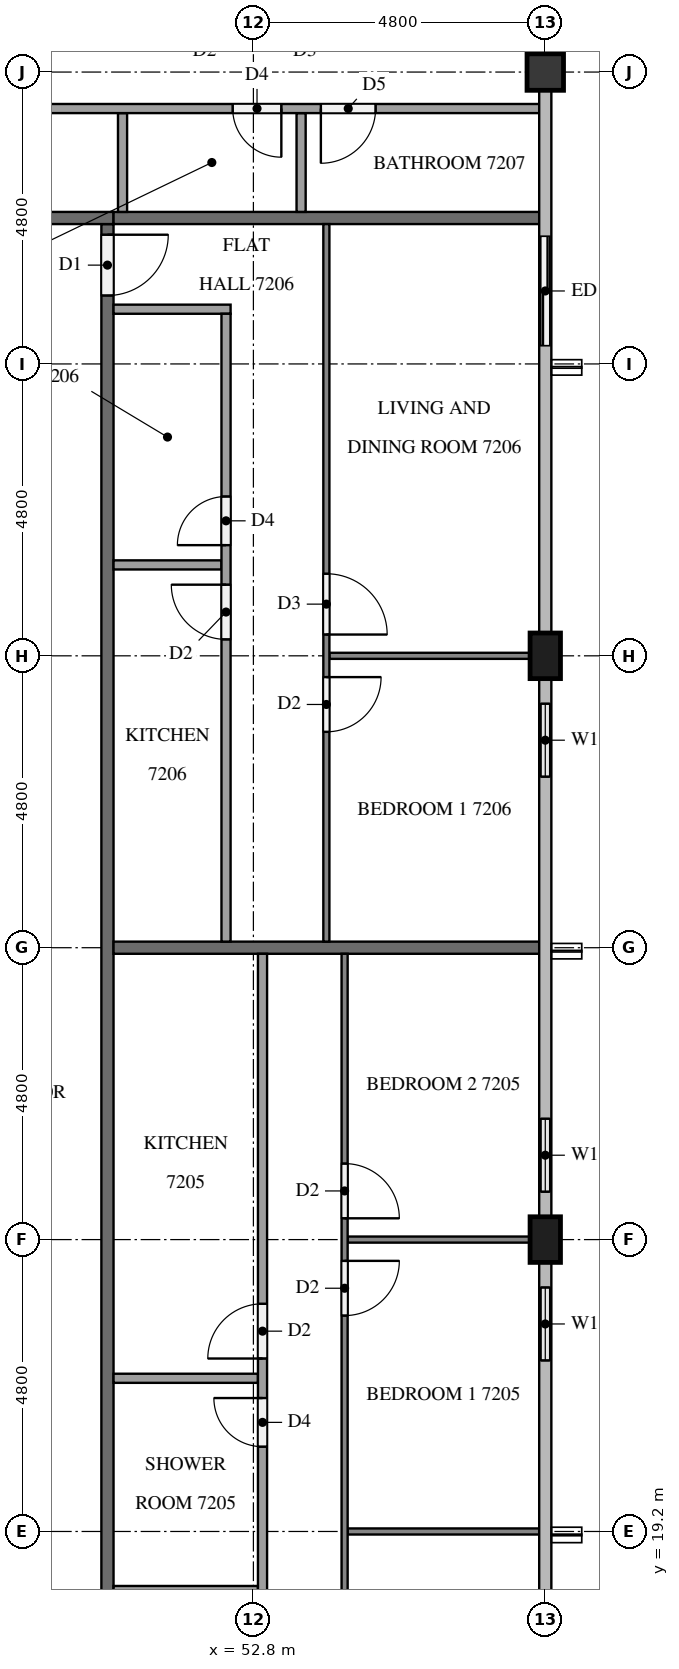
"""IFC4 building model, lengths in metres.
Left out: names, types, materials, properties, quantities, classifications, styles, units other than length and angle.
Written with IfcOpenShell. Run it as: python <this file> out.ifc"""

import sys

from ifc_helpers import new_model, si_unit, direction, frame, frame_2d, origin, origin_2d, place, context, subcontext, project, spatial, rectangle, extrude, element, fill, save


model = new_model("IFC4")
c1 = context("Model", 3, precision=1e-05, world=origin(), true_north=direction((0.0, 1.0)))
c2 = subcontext(c1, "Body", "Model", "MODEL_VIEW")
j1 = project(units=[si_unit("LENGTHUNIT", "METRE"), si_unit("PLANEANGLEUNIT", "RADIAN")], contexts=[c1])
p1 = place(None, origin())
s1 = spatial("IfcSite", under=j1, at=p1, CompositionType="ELEMENT")
p2 = place(p1, origin())
s2 = spatial("IfcBuilding", under=s1, at=p2, CompositionType="ELEMENT")
p3 = place(p2, frame((0.0, 0.0, 275.6)))
s3 = spatial("IfcBuildingStorey", under=s2, at=p3, CompositionType="ELEMENT", Elevation=275.6)
for number, where, z_axis, x_axis in (
    (1, (57.6, 24.0, 0.0), (0.0, 0.0, 1.0), (0.0, 1.0, 0.0)),
    (2, (57.6, 33.6, 0.0), (0.0, 0.0, 1.0), (0.0, 1.0, 0.0)),
):
    element("IfcColumn", number, at=place(p3, frame(where, z_axis=z_axis, x_axis=x_axis)), inside=s3, PredefinedType="COLUMN", context=c2, shape_type="SweptSolid", body=[
        extrude(rectangle(XDim=0.75, YDim=0.5, at=origin_2d()), origin(), (0.0, 0.0, 1.0), 3.2),
    ])
p4 = place(p3, frame((57.6, 43.2, 0.0), z_axis=(0.0, 0.0, 1.0), x_axis=(1.0, 0.0, 0.0)))
e3 = element("IfcColumn", 3, at=p4, inside=s3, PredefinedType="COLUMN", context=c2, shape_type="SweptSolid", body=[
    extrude(rectangle(XDim=0.6, YDim=0.6, at=origin_2d()), origin(), (0.0, 0.0, 1.0), 3.2),
])
p5 = place(p3, frame((57.6, 21.6, 0.0), z_axis=(0.0, 0.0, 1.0), x_axis=(0.0, 1.0, 0.0)))
e4 = element("IfcWall", 4, at=p5, inside=s3, PredefinedType="SOLIDWALL", context=c2, shape_type="SweptSolid", body=[
    extrude(rectangle(XDim=2.025, YDim=0.15, at=frame_2d((1.012, 0.0))), origin(), (0.0, 0.0, 1.0), 3.2),
])
p6 = place(p5, frame((0.413, 0.0, 0.9)))
e5 = element("IfcOpeningElement", 5, at=p6, cuts=e4, PredefinedType="OPENING", context=c2, shape_type="SweptSolid", body=[
    extrude(rectangle(XDim=1.2, YDim=1.4, at=frame_2d((0.6, 0.7))), frame((0.0, 0.085, 0.0), z_axis=(0.0, -1.0, 0.0), x_axis=(1.0, 0.0, 0.0)), (0.0, 0.0, 1.0), 0.17),
])
p7 = place(p3, frame((57.6, 24.375, 0.0), z_axis=(0.0, 0.0, 1.0), x_axis=(0.0, 1.0, 0.0)))
e6 = element("IfcWall", 6, at=p7, inside=s3, PredefinedType="SOLIDWALL", context=c2, shape_type="SweptSolid", body=[
    extrude(rectangle(XDim=2.025, YDim=0.15, at=frame_2d((1.012, 0.0))), origin(), (0.0, 0.0, 1.0), 3.2),
])
p8 = place(p7, frame((0.413, 0.0, 0.9)))
e7 = element("IfcOpeningElement", 7, at=p8, cuts=e6, PredefinedType="OPENING", context=c2, shape_type="SweptSolid", body=[
    extrude(rectangle(XDim=1.2, YDim=1.4, at=frame_2d((0.6, 0.7))), frame((0.0, 0.085, 0.0), z_axis=(0.0, -1.0, 0.0), x_axis=(1.0, 0.0, 0.0)), (0.0, 0.0, 1.0), 0.17),
])
p9 = place(p3, frame((57.6, 31.2, 0.0), z_axis=(0.0, 0.0, 1.0), x_axis=(0.0, 1.0, 0.0)))
e8 = element("IfcWall", 8, at=p9, inside=s3, PredefinedType="SOLIDWALL", context=c2, shape_type="SweptSolid", body=[
    extrude(rectangle(XDim=2.025, YDim=0.15, at=frame_2d((1.013, 0.0))), origin(), (0.0, 0.0, 1.0), 3.2),
])
p10 = place(p9, frame((0.413, 0.0, 0.9)))
e9 = element("IfcOpeningElement", 9, at=p10, cuts=e8, PredefinedType="OPENING", context=c2, shape_type="SweptSolid", body=[
    extrude(rectangle(XDim=1.2, YDim=1.4, at=frame_2d((0.6, 0.7))), frame((0.0, 0.085, 0.0), z_axis=(0.0, -1.0, 0.0), x_axis=(1.0, 0.0, 0.0)), (0.0, 0.0, 1.0), 0.17),
])
p11 = place(p3, frame((57.6, 38.4, 0.0), z_axis=(0.0, 0.0, 1.0), x_axis=(0.0, 1.0, 0.0)))
e10 = element("IfcWall", 10, at=p11, inside=s3, PredefinedType="SOLIDWALL", context=c2, shape_type="SweptSolid", body=[
    extrude(rectangle(XDim=2.4, YDim=0.15, at=frame_2d((1.2, 0.0))), origin(), (0.0, 0.0, 1.0), 3.2),
])
p12 = place(p11, frame((0.3, 0.0, 0.0)))
e11 = element("IfcOpeningElement", 11, at=p12, cuts=e10, PredefinedType="OPENING", context=c2, shape_type="SweptSolid", body=[
    extrude(rectangle(XDim=1.8, YDim=2.4, at=frame_2d((0.9, 1.2))), frame((0.0, 0.085, 0.0), z_axis=(0.0, -1.0, 0.0), x_axis=(1.0, 0.0, 0.0)), (0.0, 0.0, 1.0), 0.17),
])
p13 = place(p3, frame((50.4, 40.7, 0.0), z_axis=(0.0, 0.0, 1.0), x_axis=(0.0, -1.0, 0.0)))
e12 = element("IfcWall", 12, at=p13, inside=s3, PredefinedType="PARTITIONING", context=c2, shape_type="SweptSolid", body=[
    extrude(rectangle(XDim=28.6, YDim=0.2, at=frame_2d((14.3, 0.0))), origin(), (0.0, 0.0, 1.0), 3.2),
])
p14 = place(p13, frame((27.425, 0.0, 0.0)))
e13 = element("IfcOpeningElement", 13, at=p14, cuts=e12, PredefinedType="OPENING", context=c2, shape_type="SweptSolid", body=[
    extrude(rectangle(XDim=1.0, YDim=2.1, at=frame_2d((0.5, 1.05))), frame((0.0, 0.11, 0.0), z_axis=(0.0, -1.0, 0.0), x_axis=(1.0, 0.0, 0.0)), (0.0, 0.0, 1.0), 0.22),
])
p15 = place(p13, frame((0.175, 0.0, 0.0)))
e14 = element("IfcOpeningElement", 14, at=p15, cuts=e12, PredefinedType="OPENING", context=c2, shape_type="SweptSolid", body=[
    extrude(rectangle(XDim=1.0, YDim=2.1, at=frame_2d((0.5, 1.05))), frame((0.0, 0.11, 0.0), z_axis=(0.0, -1.0, 0.0), x_axis=(1.0, 0.0, 0.0)), (0.0, 0.0, 1.0), 0.22),
])
p16 = place(p3, frame((11.9, 40.8, 0.0), z_axis=(0.0, 0.0, 1.0), x_axis=(1.0, 0.0, 0.0)))
e15 = element("IfcWall", 15, at=p16, inside=s3, PredefinedType="PARTITIONING", context=c2, shape_type="SweptSolid", body=[
    extrude(rectangle(XDim=38.6, YDim=0.2, at=frame_2d((19.3, 0.0))), origin(), (0.0, 0.0, 1.0), 3.2),
])
p17 = place(p16, frame((31.575, 0.0, 0.0)))
e16 = element("IfcOpeningElement", 16, at=p17, cuts=e15, PredefinedType="OPENING", context=c2, shape_type="SweptSolid", body=[
    extrude(rectangle(XDim=1.0, YDim=2.1, at=frame_2d((0.5, 1.05))), frame((0.0, 0.11, 0.0), z_axis=(0.0, -1.0, 0.0), x_axis=(1.0, 0.0, 0.0)), (0.0, 0.0, 1.0), 0.22),
])
p18 = place(p16, frame((24.375, 0.0, 0.0)))
e17 = element("IfcOpeningElement", 17, at=p18, cuts=e15, PredefinedType="OPENING", context=c2, shape_type="SweptSolid", body=[
    extrude(rectangle(XDim=1.0, YDim=2.1, at=frame_2d((0.5, 1.05))), frame((0.0, 0.11, 0.0), z_axis=(0.0, -1.0, 0.0), x_axis=(1.0, 0.0, 0.0)), (0.0, 0.0, 1.0), 0.22),
])
p19 = place(p16, frame((22.825, 0.0, 0.0)))
e18 = element("IfcOpeningElement", 18, at=p19, cuts=e15, PredefinedType="OPENING", context=c2, shape_type="SweptSolid", body=[
    extrude(rectangle(XDim=1.0, YDim=2.1, at=frame_2d((0.5, 1.05))), frame((0.0, 0.11, 0.0), z_axis=(0.0, -1.0, 0.0), x_axis=(1.0, 0.0, 0.0)), (0.0, 0.0, 1.0), 0.22),
])
p20 = place(p16, frame((0.375, 0.0, 0.0)))
e19 = element("IfcOpeningElement", 19, at=p20, cuts=e15, PredefinedType="OPENING", context=c2, shape_type="SweptSolid", body=[
    extrude(rectangle(XDim=1.0, YDim=2.1, at=frame_2d((0.5, 1.05))), frame((0.0, 0.11, 0.0), z_axis=(0.0, -1.0, 0.0), x_axis=(1.0, 0.0, 0.0)), (0.0, 0.0, 1.0), 0.22),
])
for number, where, z_axis, x_axis in (
    (20, (50.5, 28.8, 0.0), (0.0, 0.0, 1.0), (1.0, 0.0, 0.0)),
    (21, (50.5, 40.8, 0.0), (0.0, 0.0, 1.0), (1.0, 0.0, 0.0)),
):
    element("IfcWall", number, at=place(p3, frame(where, z_axis=z_axis, x_axis=x_axis)), inside=s3, PredefinedType="PARTITIONING", context=c2, shape_type="SweptSolid", body=[
        extrude(rectangle(XDim=7.0, YDim=0.2, at=frame_2d((3.5, 0.0))), origin(), (0.0, 0.0, 1.0), 3.2),
    ])
p21 = place(p3, frame((54.35, 19.2, 0.0), z_axis=(0.0, 0.0, 1.0), x_axis=(1.0, 0.0, 0.0)))
e22 = element("IfcWall", 22, at=p21, inside=s3, PredefinedType="PARTITIONING", context=c2, shape_type="SweptSolid", body=[
    extrude(rectangle(XDim=3.15, YDim=0.1, at=frame_2d((1.575, 0.0))), origin(), (0.0, 0.0, 1.0), 3.2),
])
p22 = place(p3, frame((54.35, 24.0, 0.0), z_axis=(0.0, 0.0, 1.0), x_axis=(1.0, 0.0, 0.0)))
e23 = element("IfcWall", 23, at=p22, inside=s3, PredefinedType="PARTITIONING", context=c2, shape_type="SweptSolid", body=[
    extrude(rectangle(XDim=3.0, YDim=0.1, at=frame_2d((1.5, 0.0))), origin(), (0.0, 0.0, 1.0), 3.2),
])
p23 = place(p3, frame((54.3, 28.7, 0.0), z_axis=(0.0, 0.0, 1.0), x_axis=(0.0, -1.0, 0.0)))
e24 = element("IfcWall", 24, at=p23, inside=s3, PredefinedType="PARTITIONING", context=c2, shape_type="SweptSolid", body=[
    extrude(rectangle(XDim=16.6, YDim=0.1, at=frame_2d((8.3, 0.0))), origin(), (0.0, 0.0, 1.0), 3.2),
])
p24 = place(p23, frame((15.3, 0.0, 0.0)))
e25 = element("IfcOpeningElement", 25, at=p24, cuts=e24, PredefinedType="OPENING", context=c2, shape_type="SweptSolid", body=[
    extrude(rectangle(XDim=1.0, YDim=2.1, at=frame_2d((0.5, 1.05))), frame((0.0, 0.06, 0.0), z_axis=(0.0, -1.0, 0.0), x_axis=(1.0, 0.0, 0.0)), (0.0, 0.0, 1.0), 0.12),
])
p25 = place(p23, frame((5.05, 0.0, 0.0)))
e26 = element("IfcOpeningElement", 26, at=p25, cuts=e24, PredefinedType="OPENING", context=c2, shape_type="SweptSolid", body=[
    extrude(rectangle(XDim=0.9, YDim=2.1, at=frame_2d((0.45, 1.05))), frame((0.0, 0.06, 0.0), z_axis=(0.0, -1.0, 0.0), x_axis=(1.0, 0.0, 0.0)), (0.0, 0.0, 1.0), 0.12),
])
p26 = place(p23, frame((3.45, 0.0, 0.0)))
e27 = element("IfcOpeningElement", 27, at=p26, cuts=e24, PredefinedType="OPENING", context=c2, shape_type="SweptSolid", body=[
    extrude(rectangle(XDim=0.9, YDim=2.1, at=frame_2d((0.45, 1.05))), frame((0.0, 0.06, 0.0), z_axis=(0.0, -1.0, 0.0), x_axis=(1.0, 0.0, 0.0)), (0.0, 0.0, 1.0), 0.12),
])
for number, where, z_axis, x_axis in (
    (28, (50.5, 18.229, 0.0), (0.0, 0.0, 1.0), (1.0, 0.0, 0.0)),
    (29, (50.5, 21.719, 0.0), (0.0, 0.0, 1.0), (1.0, 0.0, 0.0)),
):
    element("IfcWall", number, at=place(p3, frame(where, z_axis=z_axis, x_axis=x_axis)), inside=s3, PredefinedType="PARTITIONING", context=c2, shape_type="SweptSolid", body=[
        extrude(rectangle(XDim=2.375, YDim=0.15, at=frame_2d((1.188, 0.0))), origin(), (0.0, 0.0, 1.0), 3.2),
    ])
p27 = place(p3, frame((52.95, 13.575, 0.0), z_axis=(0.0, 0.0, 1.0), x_axis=(0.0, 1.0, 0.0)))
e30 = element("IfcWall", 30, at=p27, inside=s3, PredefinedType="PARTITIONING", context=c2, shape_type="SweptSolid", body=[
    extrude(rectangle(XDim=15.125, YDim=0.15, at=frame_2d((7.562, 0.0))), origin(), (0.0, 0.0, 1.0), 3.2),
])
p28 = place(p27, frame((0.3, 0.0, 0.0)))
e31 = element("IfcOpeningElement", 31, at=p28, cuts=e30, PredefinedType="OPENING", context=c2, shape_type="SweptSolid", body=[
    extrude(rectangle(XDim=0.9, YDim=2.1, at=frame_2d((0.45, 1.05))), frame((0.0, 0.085, 0.0), z_axis=(0.0, -1.0, 0.0), x_axis=(1.0, 0.0, 0.0)), (0.0, 0.0, 1.0), 0.17),
])
p29 = place(p27, frame((7.019, 0.0, 0.0)))
e32 = element("IfcOpeningElement", 32, at=p29, cuts=e30, PredefinedType="OPENING", context=c2, shape_type="SweptSolid", body=[
    extrude(rectangle(XDim=0.8, YDim=2.1, at=frame_2d((0.4, 1.05))), frame((0.0, 0.085, 0.0), z_axis=(0.0, -1.0, 0.0), x_axis=(1.0, 0.0, 0.0)), (0.0, 0.0, 1.0), 0.17),
])
p30 = place(p27, frame((8.469, 0.0, 0.0)))
e33 = element("IfcOpeningElement", 33, at=p30, cuts=e30, PredefinedType="OPENING", context=c2, shape_type="SweptSolid", body=[
    extrude(rectangle(XDim=0.9, YDim=2.1, at=frame_2d((0.45, 1.05))), frame((0.0, 0.085, 0.0), z_axis=(0.0, -1.0, 0.0), x_axis=(1.0, 0.0, 0.0)), (0.0, 0.0, 1.0), 0.17),
])
p31 = place(p3, frame((54.05, 33.6, 0.0), z_axis=(0.0, 0.0, 1.0), x_axis=(1.0, 0.0, 0.0)))
e34 = element("IfcWall", 34, at=p31, inside=s3, PredefinedType="PARTITIONING", context=c2, shape_type="SweptSolid", body=[
    extrude(rectangle(XDim=3.3, YDim=0.1, at=frame_2d((1.65, 0.0))), origin(), (0.0, 0.0, 1.0), 3.2),
])
p32 = place(p3, frame((54.0, 40.7, 0.0), z_axis=(0.0, 0.0, 1.0), x_axis=(0.0, -1.0, 0.0)))
e35 = element("IfcWall", 35, at=p32, inside=s3, PredefinedType="PARTITIONING", context=c2, shape_type="SweptSolid", body=[
    extrude(rectangle(XDim=11.8, YDim=0.1, at=frame_2d((5.9, 0.0))), origin(), (0.0, 0.0, 1.0), 3.2),
])
p33 = place(p32, frame((5.75, 0.0, 0.0)))
e36 = element("IfcOpeningElement", 36, at=p33, cuts=e35, PredefinedType="OPENING", context=c2, shape_type="SweptSolid", body=[
    extrude(rectangle(XDim=1.0, YDim=2.1, at=frame_2d((0.5, 1.05))), frame((0.0, 0.06, 0.0), z_axis=(0.0, -1.0, 0.0), x_axis=(1.0, 0.0, 0.0)), (0.0, 0.0, 1.0), 0.12),
])
p34 = place(p32, frame((7.45, 0.0, 0.0)))
e37 = element("IfcOpeningElement", 37, at=p34, cuts=e35, PredefinedType="OPENING", context=c2, shape_type="SweptSolid", body=[
    extrude(rectangle(XDim=0.9, YDim=2.1, at=frame_2d((0.45, 1.05))), frame((0.0, 0.06, 0.0), z_axis=(0.0, -1.0, 0.0), x_axis=(1.0, 0.0, 0.0)), (0.0, 0.0, 1.0), 0.12),
])
p35 = place(p3, frame((50.5, 35.095, 0.0), z_axis=(0.0, 0.0, 1.0), x_axis=(1.0, 0.0, 0.0)))
e38 = element("IfcWall", 38, at=p35, inside=s3, PredefinedType="PARTITIONING", context=c2, shape_type="SweptSolid", body=[
    extrude(rectangle(XDim=1.775, YDim=0.15, at=frame_2d((0.887, 0.0))), origin(), (0.0, 0.0, 1.0), 3.2),
])
p36 = place(p3, frame((50.5, 39.3, 0.0), z_axis=(0.0, 0.0, 1.0), x_axis=(1.0, 0.0, 0.0)))
e39 = element("IfcWall", 39, at=p36, inside=s3, PredefinedType="PARTITIONING", context=c2, shape_type="SweptSolid", body=[
    extrude(rectangle(XDim=1.925, YDim=0.15, at=frame_2d((0.962, 0.0))), origin(), (0.0, 0.0, 1.0), 3.2),
])
p37 = place(p3, frame((52.35, 28.9, 0.0), z_axis=(0.0, 0.0, 1.0), x_axis=(0.0, 1.0, 0.0)))
e40 = element("IfcWall", 40, at=p37, inside=s3, PredefinedType="PARTITIONING", context=c2, shape_type="SweptSolid", body=[
    extrude(rectangle(XDim=10.325, YDim=0.15, at=frame_2d((5.163, 0.0))), origin(), (0.0, 0.0, 1.0), 3.2),
])
p38 = place(p37, frame((6.52, 0.0, 0.0)))
e41 = element("IfcOpeningElement", 41, at=p38, cuts=e40, PredefinedType="OPENING", context=c2, shape_type="SweptSolid", body=[
    extrude(rectangle(XDim=0.8, YDim=2.1, at=frame_2d((0.4, 1.05))), frame((0.0, 0.085, 0.0), z_axis=(0.0, -1.0, 0.0), x_axis=(1.0, 0.0, 0.0)), (0.0, 0.0, 1.0), 0.17),
])
p39 = place(p37, frame((4.97, 0.0, 0.0)))
e42 = element("IfcOpeningElement", 42, at=p39, cuts=e40, PredefinedType="OPENING", context=c2, shape_type="SweptSolid", body=[
    extrude(rectangle(XDim=0.9, YDim=2.1, at=frame_2d((0.45, 1.05))), frame((0.0, 0.085, 0.0), z_axis=(0.0, -1.0, 0.0), x_axis=(1.0, 0.0, 0.0)), (0.0, 0.0, 1.0), 0.17),
])
for number, where, z_axis, x_axis in (
    (43, (50.648, 40.9, 0.0), (0.0, 0.0, 1.0), (0.0, 1.0, 0.0)),
    (44, (53.585, 40.9, 0.0), (0.0, 0.0, 1.0), (0.0, 1.0, 0.0)),
):
    element("IfcWall", number, at=place(p3, frame(where, z_axis=z_axis, x_axis=x_axis)), inside=s3, PredefinedType="PARTITIONING", context=c2, shape_type="SweptSolid", body=[
        extrude(rectangle(XDim=1.625, YDim=0.15, at=frame_2d((0.812, 0.0))), origin(), (0.0, 0.0, 1.0), 3.2),
    ])
p40 = place(p3, frame((57.5, 42.6, 0.0), z_axis=(0.0, 0.0, 1.0), x_axis=(-1.0, 0.0, 0.0)))
e45 = element("IfcWall", 45, at=p40, inside=s3, PredefinedType="PARTITIONING", context=c2, shape_type="SweptSolid", body=[
    extrude(rectangle(XDim=12.725, YDim=0.15, at=frame_2d((6.363, 0.0))), origin(), (0.0, 0.0, 1.0), 3.2),
])
p41 = place(p40, frame((11.525, 0.0, 0.0)))
e46 = element("IfcOpeningElement", 46, at=p41, cuts=e45, PredefinedType="OPENING", context=c2, shape_type="SweptSolid", body=[
    extrude(rectangle(XDim=0.9, YDim=2.1, at=frame_2d((0.45, 1.05))), frame((0.0, 0.085, 0.0), z_axis=(0.0, -1.0, 0.0), x_axis=(1.0, 0.0, 0.0)), (0.0, 0.0, 1.0), 0.17),
])
p42 = place(p40, frame((4.24, 0.0, 0.0)))
e47 = element("IfcOpeningElement", 47, at=p42, cuts=e45, PredefinedType="OPENING", context=c2, shape_type="SweptSolid", body=[
    extrude(rectangle(XDim=0.8, YDim=2.1, at=frame_2d((0.4, 1.05))), frame((0.0, 0.085, 0.0), z_axis=(0.0, -1.0, 0.0), x_axis=(1.0, 0.0, 0.0)), (0.0, 0.0, 1.0), 0.17),
])
p43 = place(p40, frame((2.69, 0.0, 0.0)))
e48 = element("IfcOpeningElement", 48, at=p43, cuts=e45, PredefinedType="OPENING", context=c2, shape_type="SweptSolid", body=[
    extrude(rectangle(XDim=0.9, YDim=2.1, at=frame_2d((0.45, 1.05))), frame((0.0, 0.085, 0.0), z_axis=(0.0, -1.0, 0.0), x_axis=(1.0, 0.0, 0.0)), (0.0, 0.0, 1.0), 0.17),
])
p44 = place(p6, origin())
e49 = element("IfcWindow", 49, at=p44, inside=s3, PartitioningType="SINGLE_PANEL", PredefinedType="WINDOW", context=c2, shape_type="SweptSolid", body=[
    extrude(rectangle(XDim=1.2, YDim=1.4, at=frame_2d((0.6, 0.7))), frame((0.0, 0.03, 0.0), z_axis=(0.0, -1.0, 0.0), x_axis=(1.0, 0.0, 0.0)), (0.0, 0.0, 1.0), 0.06),
])
fill(e5, e49)
p45 = place(p8, origin())
e50 = element("IfcWindow", 50, at=p45, inside=s3, PartitioningType="SINGLE_PANEL", PredefinedType="WINDOW", context=c2, shape_type="SweptSolid", body=[
    extrude(rectangle(XDim=1.2, YDim=1.4, at=frame_2d((0.6, 0.7))), frame((0.0, 0.03, 0.0), z_axis=(0.0, -1.0, 0.0), x_axis=(1.0, 0.0, 0.0)), (0.0, 0.0, 1.0), 0.06),
])
fill(e7, e50)
p46 = place(p10, origin())
e51 = element("IfcWindow", 51, at=p46, inside=s3, PartitioningType="SINGLE_PANEL", PredefinedType="WINDOW", context=c2, shape_type="SweptSolid", body=[
    extrude(rectangle(XDim=1.2, YDim=1.4, at=frame_2d((0.6, 0.7))), frame((0.0, 0.03, 0.0), z_axis=(0.0, -1.0, 0.0), x_axis=(1.0, 0.0, 0.0)), (0.0, 0.0, 1.0), 0.06),
])
fill(e9, e51)
p47 = place(p12, origin())
e52 = element("IfcDoor", 52, at=p47, inside=s3, OperationType="SLIDING_TO_LEFT", PredefinedType="DOOR", context=c2, shape_type="SweptSolid", body=[
    extrude(rectangle(XDim=1.8, YDim=2.4, at=frame_2d((0.9, 1.2))), frame((0.0, 0.025, 0.0), z_axis=(0.0, -1.0, 0.0), x_axis=(1.0, 0.0, 0.0)), (0.0, 0.0, 1.0), 0.05),
])
fill(e11, e52)
p48 = place(p15, origin())
e53 = element("IfcDoor", 53, at=p48, inside=s3, OperationType="SINGLE_SWING_LEFT", PredefinedType="DOOR", context=c2, shape_type="SweptSolid", body=[
    extrude(rectangle(XDim=1.0, YDim=2.1, at=frame_2d((0.5, 1.05))), frame((0.0, 0.025, 0.0), z_axis=(0.0, -1.0, 0.0), x_axis=(1.0, 0.0, 0.0)), (0.0, 0.0, 1.0), 0.05),
])
fill(e14, e53)
p49 = place(p25, origin())
e54 = element("IfcDoor", 54, at=p49, inside=s3, OperationType="SINGLE_SWING_LEFT", PredefinedType="DOOR", context=c2, shape_type="SweptSolid", body=[
    extrude(rectangle(XDim=0.9, YDim=2.1, at=frame_2d((0.45, 1.05))), frame((0.0, 0.025, 0.0), z_axis=(0.0, -1.0, 0.0), x_axis=(1.0, 0.0, 0.0)), (0.0, 0.0, 1.0), 0.05),
])
fill(e26, e54)
p50 = place(p26, origin())
e55 = element("IfcDoor", 55, at=p50, inside=s3, OperationType="SINGLE_SWING_RIGHT", PredefinedType="DOOR", context=c2, shape_type="SweptSolid", body=[
    extrude(rectangle(XDim=0.9, YDim=2.1, at=frame_2d((0.45, 1.05))), frame((0.0, 0.025, 0.0), z_axis=(0.0, -1.0, 0.0), x_axis=(1.0, 0.0, 0.0)), (0.0, 0.0, 1.0), 0.05),
])
fill(e27, e55)
p51 = place(p29, origin())
e56 = element("IfcDoor", 56, at=p51, inside=s3, OperationType="SINGLE_SWING_RIGHT", PredefinedType="DOOR", context=c2, shape_type="SweptSolid", body=[
    extrude(rectangle(XDim=0.8, YDim=2.1, at=frame_2d((0.4, 1.05))), frame((0.0, 0.025, 0.0), z_axis=(0.0, -1.0, 0.0), x_axis=(1.0, 0.0, 0.0)), (0.0, 0.0, 1.0), 0.05),
])
fill(e32, e56)
p52 = place(p30, origin())
e57 = element("IfcDoor", 57, at=p52, inside=s3, OperationType="SINGLE_SWING_LEFT", PredefinedType="DOOR", context=c2, shape_type="SweptSolid", body=[
    extrude(rectangle(XDim=0.9, YDim=2.1, at=frame_2d((0.45, 1.05))), frame((0.0, 0.025, 0.0), z_axis=(0.0, -1.0, 0.0), x_axis=(1.0, 0.0, 0.0)), (0.0, 0.0, 1.0), 0.05),
])
fill(e33, e57)
p53 = place(p33, origin())
e58 = element("IfcDoor", 58, at=p53, inside=s3, OperationType="SINGLE_SWING_RIGHT", PredefinedType="DOOR", context=c2, shape_type="SweptSolid", body=[
    extrude(rectangle(XDim=1.0, YDim=2.1, at=frame_2d((0.5, 1.05))), frame((0.0, 0.025, 0.0), z_axis=(0.0, -1.0, 0.0), x_axis=(1.0, 0.0, 0.0)), (0.0, 0.0, 1.0), 0.05),
])
fill(e36, e58)
p54 = place(p34, origin())
e59 = element("IfcDoor", 59, at=p54, inside=s3, OperationType="SINGLE_SWING_LEFT", PredefinedType="DOOR", context=c2, shape_type="SweptSolid", body=[
    extrude(rectangle(XDim=0.9, YDim=2.1, at=frame_2d((0.45, 1.05))), frame((0.0, 0.025, 0.0), z_axis=(0.0, -1.0, 0.0), x_axis=(1.0, 0.0, 0.0)), (0.0, 0.0, 1.0), 0.05),
])
fill(e37, e59)
p55 = place(p38, origin())
e60 = element("IfcDoor", 60, at=p55, inside=s3, OperationType="SINGLE_SWING_LEFT", PredefinedType="DOOR", context=c2, shape_type="SweptSolid", body=[
    extrude(rectangle(XDim=0.8, YDim=2.1, at=frame_2d((0.4, 1.05))), frame((0.0, 0.025, 0.0), z_axis=(0.0, -1.0, 0.0), x_axis=(1.0, 0.0, 0.0)), (0.0, 0.0, 1.0), 0.05),
])
fill(e41, e60)
p56 = place(p39, origin())
e61 = element("IfcDoor", 61, at=p56, inside=s3, OperationType="SINGLE_SWING_RIGHT", PredefinedType="DOOR", context=c2, shape_type="SweptSolid", body=[
    extrude(rectangle(XDim=0.9, YDim=2.1, at=frame_2d((0.45, 1.05))), frame((0.0, 0.025, 0.0), z_axis=(0.0, -1.0, 0.0), x_axis=(1.0, 0.0, 0.0)), (0.0, 0.0, 1.0), 0.05),
])
fill(e42, e61)
p57 = place(p42, origin())
e62 = element("IfcDoor", 62, at=p57, inside=s3, OperationType="SINGLE_SWING_LEFT", PredefinedType="DOOR", context=c2, shape_type="SweptSolid", body=[
    extrude(rectangle(XDim=0.8, YDim=2.1, at=frame_2d((0.4, 1.05))), frame((0.0, 0.025, 0.0), z_axis=(0.0, -1.0, 0.0), x_axis=(1.0, 0.0, 0.0)), (0.0, 0.0, 1.0), 0.05),
])
fill(e47, e62)
p58 = place(p43, origin())
e63 = element("IfcDoor", 63, at=p58, inside=s3, OperationType="SINGLE_SWING_RIGHT", PredefinedType="DOOR", context=c2, shape_type="SweptSolid", body=[
    extrude(rectangle(XDim=0.9, YDim=2.1, at=frame_2d((0.45, 1.05))), frame((0.0, 0.025, 0.0), z_axis=(0.0, -1.0, 0.0), x_axis=(1.0, 0.0, 0.0)), (0.0, 0.0, 1.0), 0.05),
])
fill(e48, e63)
save(model, sys.argv[1])
